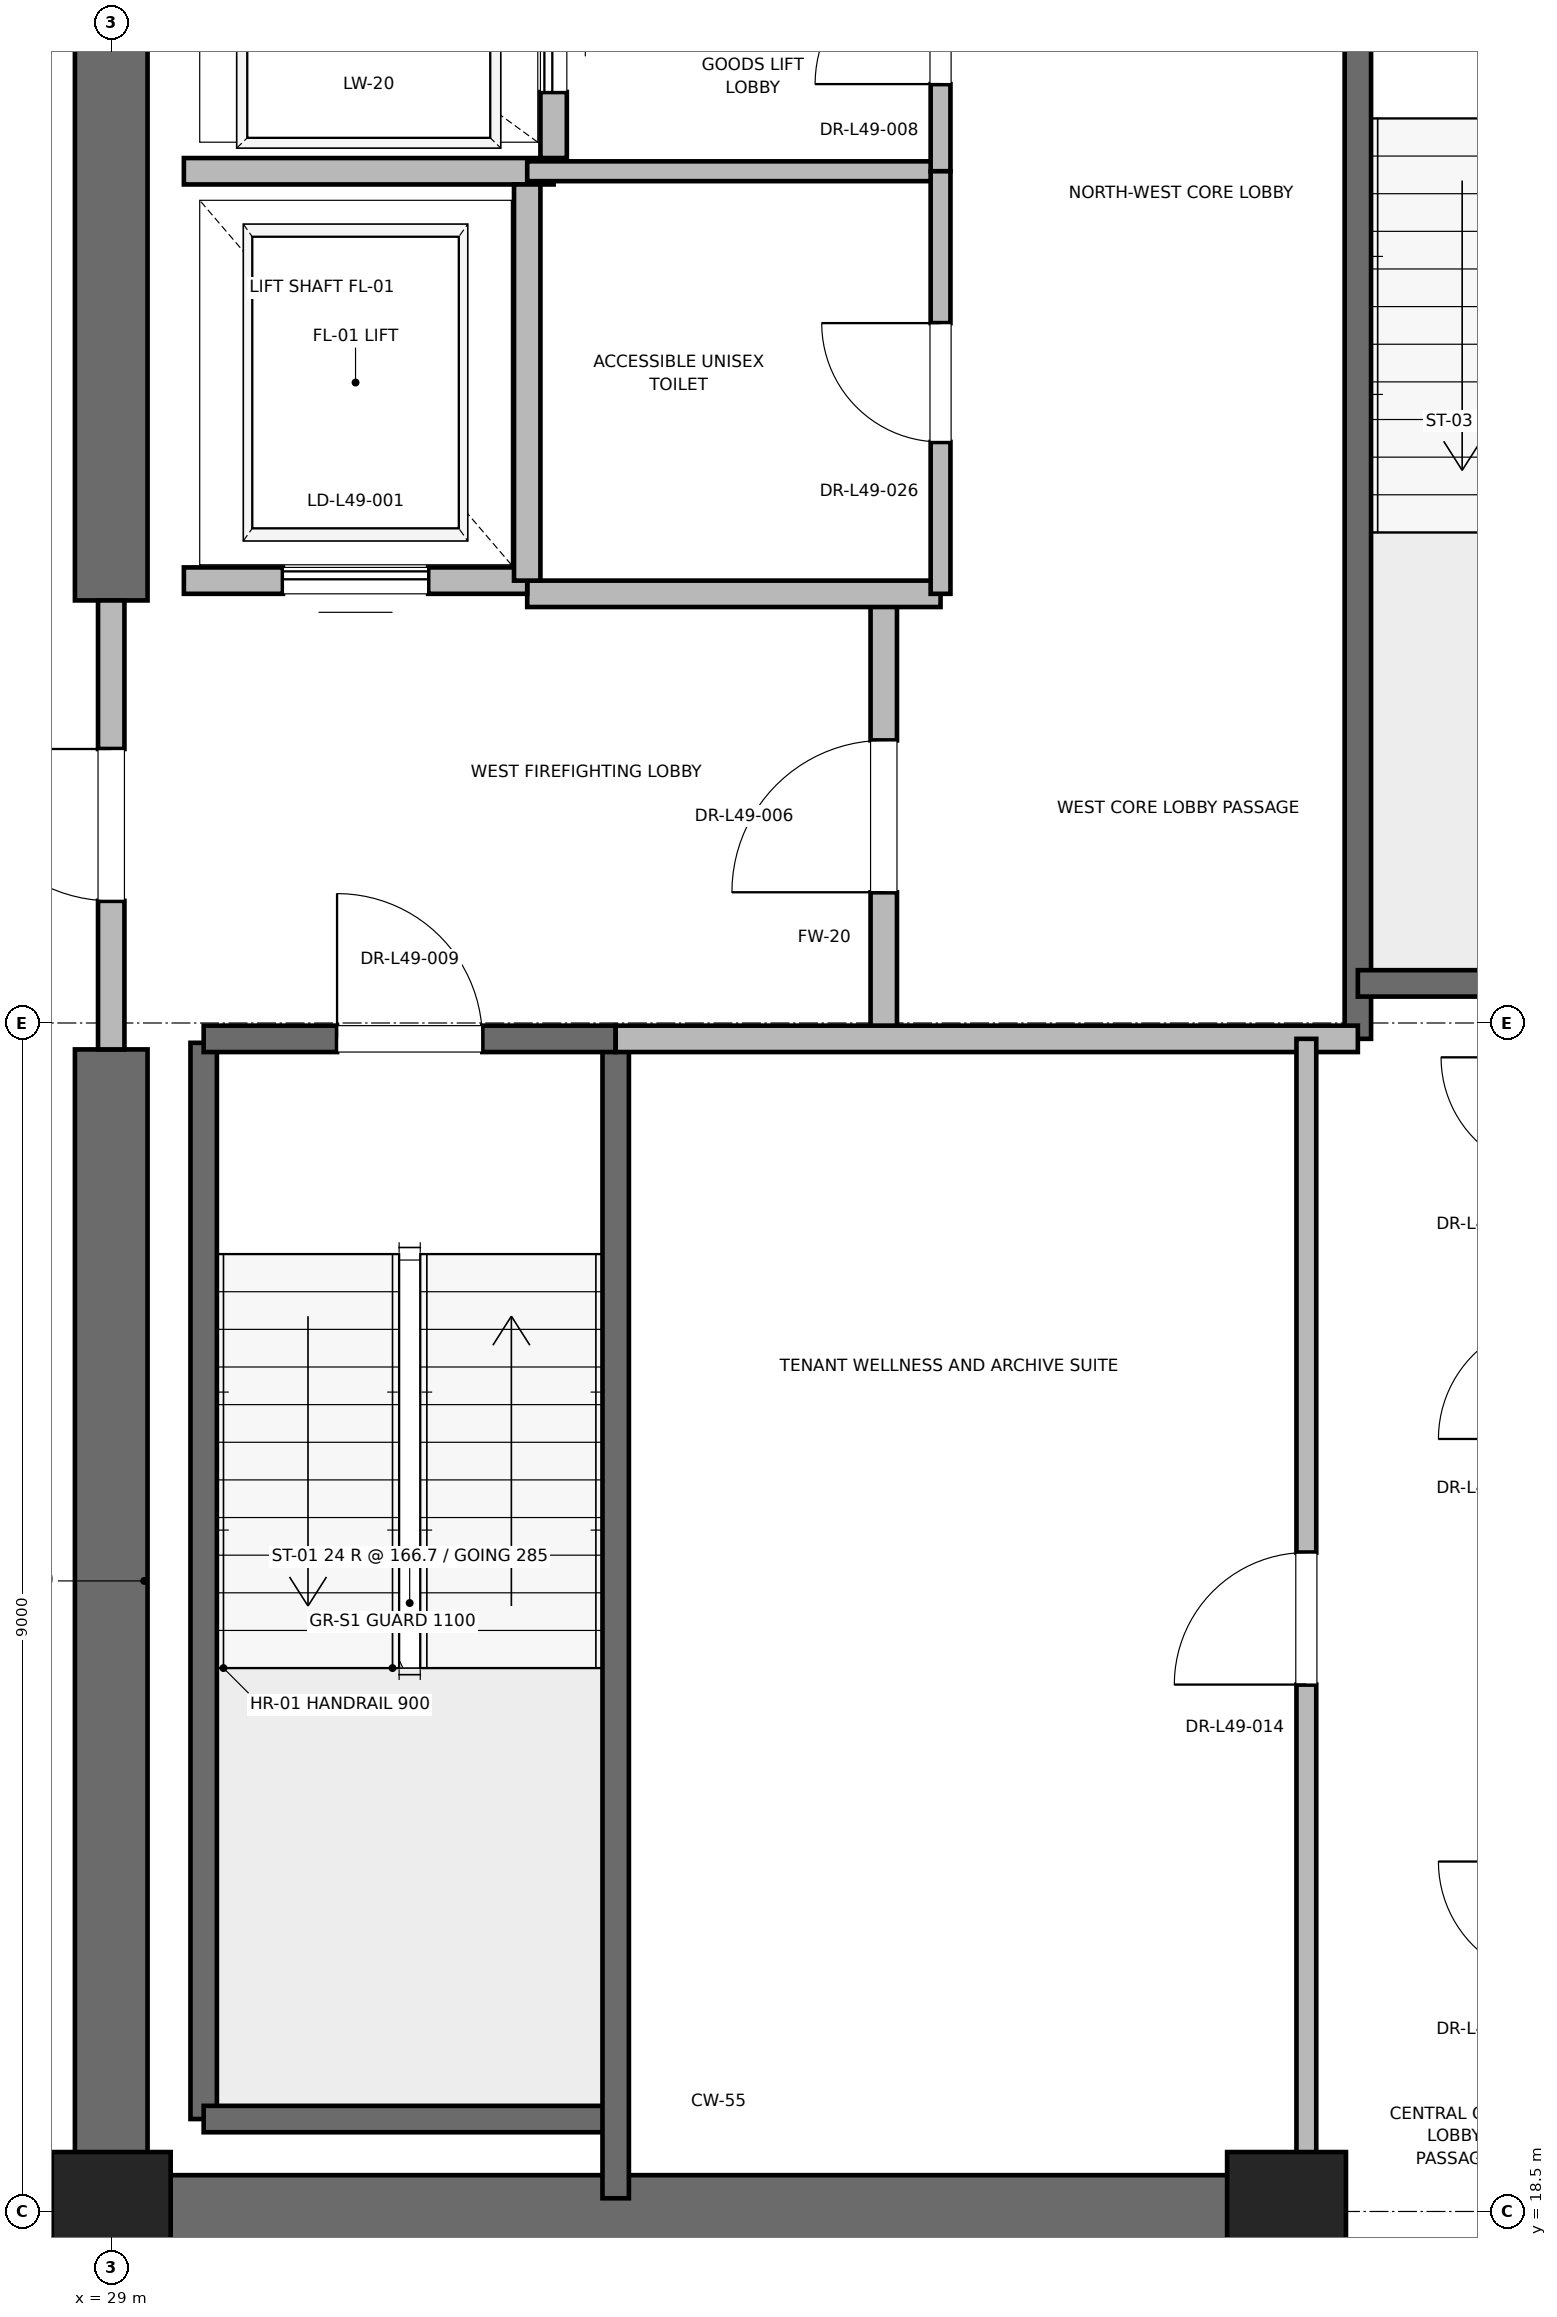
"""IFC4 building model, lengths in metres.
Left out: names, types, materials, properties, quantities, classifications, styles, units other than length and angle.
Written with IfcOpenShell. Run it as: python <this file> out.ifc"""

import sys

from ifc_helpers import new_model, si_unit, direction, frame, frame_2d, origin, origin_2d, place, context, subcontext, project, spatial, rectangle, extrude, element, fill, save


model = new_model("IFC4")
c1 = context("Model", 3, precision=1e-05, world=origin(), true_north=direction((0.0, 1.0)))
c2 = subcontext(c1, "Body", "Model", "MODEL_VIEW")
j1 = project(units=[si_unit("LENGTHUNIT", "METRE"), si_unit("PLANEANGLEUNIT", "RADIAN")], contexts=[c1])
p1 = place(None, origin())
s1 = spatial("IfcSite", under=j1, at=p1, CompositionType="ELEMENT")
p2 = place(p1, origin())
s2 = spatial("IfcBuilding", under=s1, at=p2, CompositionType="ELEMENT")
p3 = place(p2, frame((0.0, 0.0, 213.2)))
s3 = spatial("IfcBuildingStorey", under=s2, at=p3, CompositionType="ELEMENT", Elevation=213.2)
for number, where, z_axis, x_axis in (
    (1, (29.0, 18.5, 0.0), (0.0, 0.0, 1.0), (1.0, 0.0, 0.0)),
    (2, (37.9, 18.5, 0.0), (0.0, 0.0, 1.0), (1.0, 0.0, 0.0)),
):
    element("IfcColumn", number, at=place(p3, frame(where, z_axis=z_axis, x_axis=x_axis)), inside=s3, PredefinedType="PILASTER", context=c2, shape_type="SweptSolid", body=[
        extrude(rectangle(XDim=0.9, YDim=0.9, at=origin_2d()), origin(), (0.0, 0.0, 1.0), 4.0),
    ])
p4 = place(p3, frame((29.0, 18.5, 0.0), z_axis=(0.0, 0.0, 1.0), x_axis=(1.0, 0.0, 0.0)))
e3 = element("IfcWall", 3, at=p4, inside=s3, PredefinedType="SHEAR", context=c2, shape_type="SweptSolid", body=[
    extrude(rectangle(XDim=9.2, YDim=0.55, at=frame_2d((4.6, 0.0))), origin(), (0.0, 0.0, 1.0), 3.775),
])
p5 = place(p3, frame((29.0, 18.5, 0.0), z_axis=(0.0, 0.0, 1.0), x_axis=(0.0, 1.0, 0.0)))
e4 = element("IfcWall", 4, at=p5, inside=s3, PredefinedType="SHEAR", context=c2, shape_type="SweptSolid", body=[
    extrude(rectangle(XDim=8.8, YDim=0.55, at=frame_2d((4.4, 0.0))), origin(), (0.0, 0.0, 1.0), 3.775),
])
p6 = place(p3, frame((29.0, 30.7, 0.0), z_axis=(0.0, 0.0, 1.0), x_axis=(0.0, 1.0, 0.0)))
e5 = element("IfcWall", 5, at=p6, inside=s3, PredefinedType="SHEAR", context=c2, shape_type="SweptSolid", body=[
    extrude(rectangle(XDim=5.8, YDim=0.55, at=frame_2d((2.9, 0.0))), origin(), (0.0, 0.0, 1.0), 3.775),
])
p7 = place(p3, frame((29.7, 19.2, 0.0), z_axis=(0.0, 0.0, 1.0), x_axis=(0.0, 1.0, 0.0)))
e6 = element("IfcWall", 6, at=p7, inside=s3, PredefinedType="SOLIDWALL", context=c2, shape_type="SweptSolid", body=[
    extrude(rectangle(XDim=8.15, YDim=0.2, at=frame_2d((4.075, 0.0))), origin(), (0.0, 0.0, 1.0), 3.775),
])
p8 = place(p3, frame((29.7, 19.2, 0.0), z_axis=(0.0, 0.0, 1.0), x_axis=(1.0, 0.0, 0.0)))
e7 = element("IfcWall", 7, at=p8, inside=s3, PredefinedType="SOLIDWALL", context=c2, shape_type="SweptSolid", body=[
    extrude(rectangle(XDim=3.12, YDim=0.2, at=frame_2d((1.56, 0.0))), origin(), (0.0, 0.0, 1.0), 3.775),
])
p9 = place(p3, frame((32.82, 18.6, 0.0), z_axis=(0.0, 0.0, 1.0), x_axis=(0.0, 1.0, 0.0)))
e8 = element("IfcWall", 8, at=p9, inside=s3, PredefinedType="SOLIDWALL", context=c2, shape_type="SweptSolid", body=[
    extrude(rectangle(XDim=8.78, YDim=0.2, at=frame_2d((4.39, 0.0))), origin(), (0.0, 0.0, 1.0), 3.775),
])
p10 = place(p3, frame((29.7, 27.38, 0.0), z_axis=(0.0, 0.0, 1.0), x_axis=(1.0, 0.0, 0.0)))
e9 = element("IfcWall", 9, at=p10, inside=s3, PredefinedType="SOLIDWALL", context=c2, shape_type="SweptSolid", body=[
    extrude(rectangle(XDim=3.12, YDim=0.2, at=frame_2d((1.56, 0.0))), origin(), (0.0, 0.0, 1.0), 3.775),
])
p11 = place(p10, frame((1.01, 0.0, 0.0)))
e10 = element("IfcOpeningElement", 10, at=p11, cuts=e9, PredefinedType="OPENING", context=c2, shape_type="SweptSolid", body=[
    extrude(rectangle(XDim=1.1, YDim=2.15, at=frame_2d((0.55, 1.075))), frame((0.0, 0.1, 0.0), z_axis=(0.0, -1.0, 0.0), x_axis=(1.0, 0.0, 0.0)), (0.0, 0.0, 1.0), 0.2),
])
p12 = place(p3, frame((38.44, 27.38, 0.0), z_axis=(0.0, 0.0, 1.0), x_axis=(0.0, 1.0, 0.0)))
e11 = element("IfcWall", 11, at=p12, inside=s3, PredefinedType="SOLIDWALL", context=c2, shape_type="SweptSolid", body=[
    extrude(rectangle(XDim=8.87, YDim=0.2, at=frame_2d((4.435, 0.0))), origin(), (0.0, 0.0, 1.0), 3.775),
])
p13 = place(p3, frame((38.44, 27.8, 0.0), z_axis=(0.0, 0.0, 1.0), x_axis=(1.0, 0.0, 0.0)))
e12 = element("IfcWall", 12, at=p13, inside=s3, PredefinedType="SOLIDWALL", context=c2, shape_type="SweptSolid", body=[
    extrude(rectangle(XDim=3.32, YDim=0.2, at=frame_2d((1.66, 0.0))), origin(), (0.0, 0.0, 1.0), 3.775),
])
p14 = place(p3, frame((34.85, 27.38, 0.0), z_axis=(0.0, 0.0, 1.0), x_axis=(0.0, 1.0, 0.0)))
e13 = element("IfcWall", 13, at=p14, inside=s3, PredefinedType="PARTITIONING", context=c2, shape_type="SweptSolid", body=[
    extrude(rectangle(XDim=3.37, YDim=0.2, at=frame_2d((1.685, 0.0))), origin(), (0.0, 0.0, 1.0), 3.775),
])
p15 = place(p14, frame((1.11, 0.0, 0.0)))
e14 = element("IfcOpeningElement", 14, at=p15, cuts=e13, PredefinedType="OPENING", context=c2, shape_type="SweptSolid", body=[
    extrude(rectangle(XDim=1.15, YDim=2.2, at=frame_2d((0.575, 1.1))), frame((0.0, 0.1, 0.0), z_axis=(0.0, -1.0, 0.0), x_axis=(1.0, 0.0, 0.0)), (0.0, 0.0, 1.0), 0.2),
])
p16 = place(p3, frame((29.0, 27.3, 0.0), z_axis=(0.0, 0.0, 1.0), x_axis=(0.0, 1.0, 0.0)))
e15 = element("IfcWall", 15, at=p16, inside=s3, PredefinedType="PARTITIONING", context=c2, shape_type="SweptSolid", body=[
    extrude(rectangle(XDim=3.4, YDim=0.2, at=frame_2d((1.7, 0.0))), origin(), (0.0, 0.0, 1.0), 2.755),
])
p17 = place(p16, frame((1.125, 0.0, 0.0)))
e16 = element("IfcOpeningElement", 16, at=p17, cuts=e15, PredefinedType="OPENING", context=c2, shape_type="SweptSolid", body=[
    extrude(rectangle(XDim=1.15, YDim=2.2, at=frame_2d((0.575, 1.1))), frame((0.0, 0.1, 0.0), z_axis=(0.0, -1.0, 0.0), x_axis=(1.0, 0.0, 0.0)), (0.0, 0.0, 1.0), 0.2),
])
p18 = place(p3, frame((32.82, 27.38, 0.0), z_axis=(0.0, 0.0, 1.0), x_axis=(1.0, 0.0, 0.0)))
e17 = element("IfcWall", 17, at=p18, inside=s3, PredefinedType="PARTITIONING", context=c2, shape_type="SweptSolid", body=[
    extrude(rectangle(XDim=5.62, YDim=0.2, at=frame_2d((2.81, 0.0))), origin(), (0.0, 0.0, 1.0), 3.775),
])
p19 = place(p3, frame((32.15, 30.75, 0.0), z_axis=(0.0, 0.0, 1.0), x_axis=(1.0, 0.0, 0.0)))
e18 = element("IfcWall", 18, at=p19, inside=s3, PredefinedType="PARTITIONING", context=c2, shape_type="SweptSolid", body=[
    extrude(rectangle(XDim=3.13, YDim=0.2, at=frame_2d((1.565, 0.0))), origin(), (0.0, 0.0, 1.0), 3.775),
])
p20 = place(p3, frame((29.55, 30.85, 0.0), z_axis=(0.0, 0.0, 1.0), x_axis=(1.0, 0.0, 0.0)))
e19 = element("IfcWall", 19, at=p20, inside=s3, PredefinedType="SOLIDWALL", context=c2, shape_type="SweptSolid", body=[
    extrude(rectangle(XDim=2.6, YDim=0.2, at=frame_2d((1.3, 0.0))), origin(), (0.0, 0.0, 1.0), 2.755),
])
p21 = place(p20, frame((0.75, 0.0, 0.0)))
e20 = element("IfcOpeningElement", 20, at=p21, cuts=e19, PredefinedType="OPENING", context=c2, shape_type="SweptSolid", body=[
    extrude(rectangle(XDim=1.1, YDim=2.2, at=frame_2d((0.55, 1.1))), frame((0.0, 0.1, 0.0), z_axis=(0.0, -1.0, 0.0), x_axis=(1.0, 0.0, 0.0)), (0.0, 0.0, 1.0), 0.2),
])
p22 = place(p3, frame((29.55, 33.95, 0.0), z_axis=(0.0, 0.0, 1.0), x_axis=(1.0, 0.0, 0.0)))
e21 = element("IfcWall", 21, at=p22, inside=s3, PredefinedType="SOLIDWALL", context=c2, shape_type="SweptSolid", body=[
    extrude(rectangle(XDim=2.8, YDim=0.2, at=frame_2d((1.4, 0.0))), origin(), (0.0, 0.0, 1.0), 3.775),
])
p23 = place(p3, frame((32.15, 30.85, 0.0), z_axis=(0.0, 0.0, 1.0), x_axis=(0.0, 1.0, 0.0)))
e22 = element("IfcWall", 22, at=p23, inside=s3, PredefinedType="SOLIDWALL", context=c2, shape_type="SweptSolid", body=[
    extrude(rectangle(XDim=3.0, YDim=0.2, at=frame_2d((1.5, 0.0))), origin(), (0.0, 0.0, 1.0), 3.775),
])
p24 = place(p3, frame((32.35, 34.05, 0.0), z_axis=(0.0, 0.0, 1.0), x_axis=(0.0, 1.0, 0.0)))
e23 = element("IfcWall", 23, at=p24, inside=s3, PredefinedType="SOLIDWALL", context=c2, shape_type="SweptSolid", body=[
    extrude(rectangle(XDim=2.1, YDim=0.2, at=frame_2d((1.05, 0.0))), origin(), (0.0, 0.0, 1.0), 3.775),
])
p25 = place(p24, frame((0.5, 0.0, 0.0)))
e24 = element("IfcOpeningElement", 24, at=p25, cuts=e23, PredefinedType="OPENING", context=c2, shape_type="SweptSolid", body=[
    extrude(rectangle(XDim=1.1, YDim=2.2, at=frame_2d((0.55, 1.1))), frame((0.0, 0.1, 0.0), z_axis=(0.0, -1.0, 0.0), x_axis=(1.0, 0.0, 0.0)), (0.0, 0.0, 1.0), 0.2),
])
p26 = place(p3, frame((32.15, 33.95, 0.0), z_axis=(0.0, 0.0, 1.0), x_axis=(1.0, 0.0, 0.0)))
e25 = element("IfcWall", 25, at=p26, inside=s3, PredefinedType="PARTITIONING", context=c2, shape_type="SweptSolid", body=[
    extrude(rectangle(XDim=3.13, YDim=0.15, at=frame_2d((1.565, 0.0))), origin(), (0.0, 0.0, 1.0), 2.85),
])
p27 = place(p3, frame((35.28, 33.95, 0.0), z_axis=(0.0, 0.0, 1.0), x_axis=(0.0, 1.0, 0.0)))
e26 = element("IfcWall", 26, at=p27, inside=s3, PredefinedType="PARTITIONING", context=c2, shape_type="SweptSolid", body=[
    extrude(rectangle(XDim=2.27, YDim=0.15, at=frame_2d((1.135, 0.0))), origin(), (0.0, 0.0, 1.0), 2.755),
])
p28 = place(p27, frame((0.66, 0.0, 0.0)))
e27 = element("IfcOpeningElement", 27, at=p28, cuts=e26, PredefinedType="OPENING", context=c2, shape_type="SweptSolid", body=[
    extrude(rectangle(XDim=0.95, YDim=2.15, at=frame_2d((0.475, 1.075))), frame((0.0, 0.075, 0.0), z_axis=(0.0, -1.0, 0.0), x_axis=(1.0, 0.0, 0.0)), (0.0, 0.0, 1.0), 0.15),
])
p29 = place(p3, frame((35.28, 30.75, 0.0), z_axis=(0.0, 0.0, 1.0), x_axis=(0.0, 1.0, 0.0)))
e28 = element("IfcWall", 28, at=p29, inside=s3, PredefinedType="PARTITIONING", context=c2, shape_type="SweptSolid", body=[
    extrude(rectangle(XDim=3.2, YDim=0.15, at=frame_2d((1.6, 0.0))), origin(), (0.0, 0.0, 1.0), 2.85),
])
p30 = place(p29, frame((1.15, 0.0, 0.0)))
e29 = element("IfcOpeningElement", 29, at=p30, cuts=e28, PredefinedType="OPENING", context=c2, shape_type="SweptSolid", body=[
    extrude(rectangle(XDim=0.9, YDim=2.1, at=frame_2d((0.45, 1.05))), frame((0.0, 0.075, 0.0), z_axis=(0.0, -1.0, 0.0), x_axis=(1.0, 0.0, 0.0)), (0.0, 0.0, 1.0), 0.15),
])
p31 = place(p3, frame((38.05, 18.6, 0.0), z_axis=(0.0, 0.0, 1.0), x_axis=(0.0, 1.0, 0.0)))
e30 = element("IfcWall", 30, at=p31, inside=s3, PredefinedType="PARTITIONING", context=c2, shape_type="SweptSolid", body=[
    extrude(rectangle(XDim=8.78, YDim=0.15, at=frame_2d((4.39, 0.0))), origin(), (0.0, 0.0, 1.0), 2.755),
])
p32 = place(p31, frame((3.89, 0.0, 0.0)))
e31 = element("IfcOpeningElement", 31, at=p32, cuts=e30, PredefinedType="OPENING", context=c2, shape_type="SweptSolid", body=[
    extrude(rectangle(XDim=1.0, YDim=2.15, at=frame_2d((0.5, 1.075))), frame((0.0, 0.075, 0.0), z_axis=(0.0, -1.0, 0.0), x_axis=(1.0, 0.0, 0.0)), (0.0, 0.0, 1.0), 0.15),
])
p33 = place(p11, origin())
e32 = element("IfcDoor", 32, at=p33, inside=s3, OperationType="SINGLE_SWING_LEFT", PredefinedType="DOOR", context=c2, shape_type="SweptSolid", body=[
    extrude(rectangle(XDim=1.1, YDim=2.15, at=frame_2d((0.55, 1.075))), frame((0.0, 0.025, 0.0), z_axis=(0.0, -1.0, 0.0), x_axis=(1.0, 0.0, 0.0)), (0.0, 0.0, 1.0), 0.05),
])
fill(e10, e32)
p34 = place(p15, origin())
e33 = element("IfcDoor", 33, at=p34, inside=s3, OperationType="SINGLE_SWING_LEFT", PredefinedType="DOOR", context=c2, shape_type="SweptSolid", body=[
    extrude(rectangle(XDim=1.15, YDim=2.2, at=frame_2d((0.575, 1.1))), frame((0.0, 0.025, 0.0), z_axis=(0.0, -1.0, 0.0), x_axis=(1.0, 0.0, 0.0)), (0.0, 0.0, 1.0), 0.05),
])
fill(e14, e33)
p35 = place(p17, origin())
e34 = element("IfcDoor", 34, at=p35, inside=s3, OperationType="SINGLE_SWING_RIGHT", PredefinedType="DOOR", context=c2, shape_type="SweptSolid", body=[
    extrude(rectangle(XDim=1.15, YDim=2.2, at=frame_2d((0.575, 1.1))), frame((0.0, 0.025, 0.0), z_axis=(0.0, -1.0, 0.0), x_axis=(1.0, 0.0, 0.0)), (0.0, 0.0, 1.0), 0.05),
])
fill(e16, e34)
p36 = place(p21, origin())
e35 = element("IfcDoor", 35, at=p36, inside=s3, OperationType="SLIDING_TO_RIGHT", PredefinedType="DOOR", context=c2, shape_type="SweptSolid", body=[
    extrude(rectangle(XDim=1.1, YDim=2.2, at=frame_2d((0.55, 1.1))), frame((0.0, 0.025, 0.0), z_axis=(0.0, -1.0, 0.0), x_axis=(1.0, 0.0, 0.0)), (0.0, 0.0, 1.0), 0.05),
])
fill(e20, e35)
p37 = place(p25, origin())
e36 = element("IfcDoor", 36, at=p37, inside=s3, OperationType="SLIDING_TO_RIGHT", PredefinedType="DOOR", context=c2, shape_type="SweptSolid", body=[
    extrude(rectangle(XDim=1.1, YDim=2.2, at=frame_2d((0.55, 1.1))), frame((0.0, 0.025, 0.0), z_axis=(0.0, -1.0, 0.0), x_axis=(1.0, 0.0, 0.0)), (0.0, 0.0, 1.0), 0.05),
])
fill(e24, e36)
p38 = place(p28, origin())
e37 = element("IfcDoor", 37, at=p38, inside=s3, OperationType="SINGLE_SWING_LEFT", PredefinedType="DOOR", context=c2, shape_type="SweptSolid", body=[
    extrude(rectangle(XDim=0.95, YDim=2.15, at=frame_2d((0.475, 1.075))), frame((0.0, 0.025, 0.0), z_axis=(0.0, -1.0, 0.0), x_axis=(1.0, 0.0, 0.0)), (0.0, 0.0, 1.0), 0.05),
])
fill(e27, e37)
p39 = place(p30, origin())
e38 = element("IfcDoor", 38, at=p39, inside=s3, OperationType="SINGLE_SWING_RIGHT", PredefinedType="DOOR", context=c2, shape_type="SweptSolid", body=[
    extrude(rectangle(XDim=0.9, YDim=2.1, at=frame_2d((0.45, 1.05))), frame((0.0, 0.025, 0.0), z_axis=(0.0, -1.0, 0.0), x_axis=(1.0, 0.0, 0.0)), (0.0, 0.0, 1.0), 0.05),
])
fill(e29, e38)
p40 = place(p32, origin())
e39 = element("IfcDoor", 39, at=p40, inside=s3, OperationType="SINGLE_SWING_LEFT", PredefinedType="DOOR", context=c2, shape_type="SweptSolid", body=[
    extrude(rectangle(XDim=1.0, YDim=2.15, at=frame_2d((0.5, 1.075))), frame((0.0, 0.025, 0.0), z_axis=(0.0, -1.0, 0.0), x_axis=(1.0, 0.0, 0.0)), (0.0, 0.0, 1.0), 0.05),
])
fill(e31, e39)
save(model, sys.argv[1])
